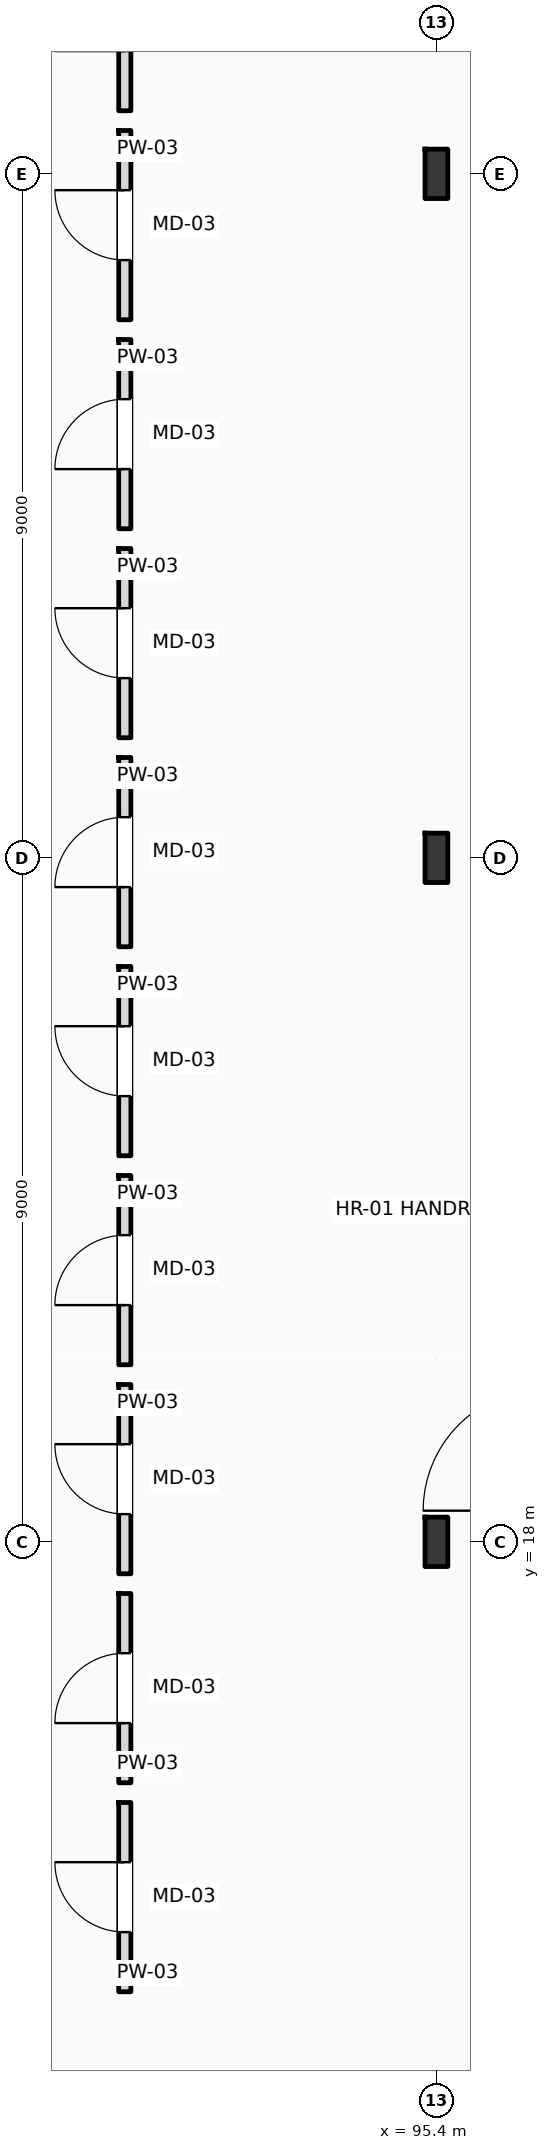
"""IFC4 building model, lengths in metres.
Left out: names, types, materials, properties, quantities, classifications, styles, units other than length and angle.
Written with IfcOpenShell. Run it as: python <this file> out.ifc"""

import sys

from ifc_helpers import new_model, si_unit, direction, frame, frame_2d, origin, origin_2d, place, context, subcontext, project, spatial, rectangle, i_section, extrude, element, fill, save


model = new_model("IFC4")
c1 = context("Model", 3, precision=1e-05, world=origin(), true_north=direction((0.0, 1.0)))
c2 = subcontext(c1, "Body", "Model", "MODEL_VIEW")
j1 = project(units=[si_unit("LENGTHUNIT", "METRE"), si_unit("PLANEANGLEUNIT", "RADIAN")], contexts=[c1])
p1 = place(None, origin())
s1 = spatial("IfcSite", under=j1, at=p1, CompositionType="ELEMENT")
p2 = place(p1, origin())
s2 = spatial("IfcBuilding", under=s1, at=p2, CompositionType="ELEMENT")
p3 = place(p2, frame((0.0, 0.0, 6.0)))
s3 = spatial("IfcBuildingStorey", under=s2, at=p3, CompositionType="ELEMENT", Elevation=6.0)
for number, where, z_axis, x_axis in (
    (1, (95.4, 18.0, 0.0), (0.0, 0.0, 1.0), (1.0, 0.0, 0.0)),
    (2, (95.4, 27.0, 0.0), (0.0, 0.0, 1.0), (1.0, 0.0, 0.0)),
    (3, (95.4, 36.0, 0.0), (0.0, 0.0, 1.0), (1.0, 0.0, 0.0)),
):
    element("IfcColumn", number, at=place(p3, frame(where, z_axis=z_axis, x_axis=x_axis)), inside=s3, PredefinedType="COLUMN", context=c2, shape_type="SweptSolid", body=[
        extrude(i_section(OverallWidth=0.3, OverallDepth=0.65, WebThickness=0.016, FlangeThickness=0.031, FilletRadius=0.027, at=origin_2d()), origin(), (0.0, 0.0, 1.0), 5.4),
    ])
p4 = place(p3, frame((91.3, 12.08, 0.0), z_axis=(0.0, 0.0, 1.0), x_axis=(0.0, 1.0, 0.0)))
e4 = element("IfcWall", 4, at=p4, inside=s3, PredefinedType="PARTITIONING", context=c2, shape_type="SweptSolid", body=[
    extrude(rectangle(XDim=2.49, YDim=0.16, at=frame_2d((1.245, 0.0))), origin(), (0.0, 0.0, 1.0), 5.05),
])
p5 = place(p4, frame((0.785, 0.0, 0.0)))
e5 = element("IfcOpeningElement", 5, at=p5, cuts=e4, PredefinedType="OPENING", context=c2, shape_type="SweptSolid", body=[
    extrude(rectangle(XDim=0.92, YDim=2.12, at=frame_2d((0.46, 1.06))), frame((0.0, 0.09, 0.0), z_axis=(0.0, -1.0, 0.0), x_axis=(1.0, 0.0, 0.0)), (0.0, 0.0, 1.0), 0.18),
])
p6 = place(p3, frame((91.3, 14.83, 0.0), z_axis=(0.0, 0.0, 1.0), x_axis=(0.0, 1.0, 0.0)))
e6 = element("IfcWall", 6, at=p6, inside=s3, PredefinedType="PARTITIONING", context=c2, shape_type="SweptSolid", body=[
    extrude(rectangle(XDim=2.49, YDim=0.16, at=frame_2d((1.245, 0.0))), origin(), (0.0, 0.0, 1.0), 5.05),
])
p7 = place(p6, frame((0.785, 0.0, 0.0)))
e7 = element("IfcOpeningElement", 7, at=p7, cuts=e6, PredefinedType="OPENING", context=c2, shape_type="SweptSolid", body=[
    extrude(rectangle(XDim=0.92, YDim=2.12, at=frame_2d((0.46, 1.06))), frame((0.0, 0.09, 0.0), z_axis=(0.0, -1.0, 0.0), x_axis=(1.0, 0.0, 0.0)), (0.0, 0.0, 1.0), 0.18),
])
p8 = place(p3, frame((91.3, 17.58, 0.0), z_axis=(0.0, 0.0, 1.0), x_axis=(0.0, 1.0, 0.0)))
e8 = element("IfcWall", 8, at=p8, inside=s3, PredefinedType="PARTITIONING", context=c2, shape_type="SweptSolid", body=[
    extrude(rectangle(XDim=2.49, YDim=0.16, at=frame_2d((1.245, 0.0))), origin(), (0.0, 0.0, 1.0), 5.05),
])
p9 = place(p8, frame((0.785, 0.0, 0.0)))
e9 = element("IfcOpeningElement", 9, at=p9, cuts=e8, PredefinedType="OPENING", context=c2, shape_type="SweptSolid", body=[
    extrude(rectangle(XDim=0.92, YDim=2.12, at=frame_2d((0.46, 1.06))), frame((0.0, 0.09, 0.0), z_axis=(0.0, -1.0, 0.0), x_axis=(1.0, 0.0, 0.0)), (0.0, 0.0, 1.0), 0.18),
])
p10 = place(p3, frame((91.3, 20.33, 0.0), z_axis=(0.0, 0.0, 1.0), x_axis=(0.0, 1.0, 0.0)))
e10 = element("IfcWall", 10, at=p10, inside=s3, PredefinedType="PARTITIONING", context=c2, shape_type="SweptSolid", body=[
    extrude(rectangle(XDim=2.49, YDim=0.16, at=frame_2d((1.245, 0.0))), origin(), (0.0, 0.0, 1.0), 5.05),
])
p11 = place(p10, frame((0.785, 0.0, 0.0)))
e11 = element("IfcOpeningElement", 11, at=p11, cuts=e10, PredefinedType="OPENING", context=c2, shape_type="SweptSolid", body=[
    extrude(rectangle(XDim=0.92, YDim=2.12, at=frame_2d((0.46, 1.06))), frame((0.0, 0.09, 0.0), z_axis=(0.0, -1.0, 0.0), x_axis=(1.0, 0.0, 0.0)), (0.0, 0.0, 1.0), 0.18),
])
p12 = place(p3, frame((91.3, 23.08, 0.0), z_axis=(0.0, 0.0, 1.0), x_axis=(0.0, 1.0, 0.0)))
e12 = element("IfcWall", 12, at=p12, inside=s3, PredefinedType="PARTITIONING", context=c2, shape_type="SweptSolid", body=[
    extrude(rectangle(XDim=2.49, YDim=0.16, at=frame_2d((1.245, 0.0))), origin(), (0.0, 0.0, 1.0), 5.05),
])
p13 = place(p12, frame((0.785, 0.0, 0.0)))
e13 = element("IfcOpeningElement", 13, at=p13, cuts=e12, PredefinedType="OPENING", context=c2, shape_type="SweptSolid", body=[
    extrude(rectangle(XDim=0.92, YDim=2.12, at=frame_2d((0.46, 1.06))), frame((0.0, 0.09, 0.0), z_axis=(0.0, -1.0, 0.0), x_axis=(1.0, 0.0, 0.0)), (0.0, 0.0, 1.0), 0.18),
])
p14 = place(p3, frame((91.3, 25.83, 0.0), z_axis=(0.0, 0.0, 1.0), x_axis=(0.0, 1.0, 0.0)))
e14 = element("IfcWall", 14, at=p14, inside=s3, PredefinedType="PARTITIONING", context=c2, shape_type="SweptSolid", body=[
    extrude(rectangle(XDim=2.49, YDim=0.16, at=frame_2d((1.245, 0.0))), origin(), (0.0, 0.0, 1.0), 5.05),
])
p15 = place(p14, frame((0.785, 0.0, 0.0)))
e15 = element("IfcOpeningElement", 15, at=p15, cuts=e14, PredefinedType="OPENING", context=c2, shape_type="SweptSolid", body=[
    extrude(rectangle(XDim=0.92, YDim=2.12, at=frame_2d((0.46, 1.06))), frame((0.0, 0.09, 0.0), z_axis=(0.0, -1.0, 0.0), x_axis=(1.0, 0.0, 0.0)), (0.0, 0.0, 1.0), 0.18),
])
p16 = place(p3, frame((91.3, 28.58, 0.0), z_axis=(0.0, 0.0, 1.0), x_axis=(0.0, 1.0, 0.0)))
e16 = element("IfcWall", 16, at=p16, inside=s3, PredefinedType="PARTITIONING", context=c2, shape_type="SweptSolid", body=[
    extrude(rectangle(XDim=2.49, YDim=0.16, at=frame_2d((1.245, 0.0))), origin(), (0.0, 0.0, 1.0), 5.05),
])
p17 = place(p16, frame((0.785, 0.0, 0.0)))
e17 = element("IfcOpeningElement", 17, at=p17, cuts=e16, PredefinedType="OPENING", context=c2, shape_type="SweptSolid", body=[
    extrude(rectangle(XDim=0.92, YDim=2.12, at=frame_2d((0.46, 1.06))), frame((0.0, 0.09, 0.0), z_axis=(0.0, -1.0, 0.0), x_axis=(1.0, 0.0, 0.0)), (0.0, 0.0, 1.0), 0.18),
])
p18 = place(p3, frame((91.3, 31.33, 0.0), z_axis=(0.0, 0.0, 1.0), x_axis=(0.0, 1.0, 0.0)))
e18 = element("IfcWall", 18, at=p18, inside=s3, PredefinedType="PARTITIONING", context=c2, shape_type="SweptSolid", body=[
    extrude(rectangle(XDim=2.49, YDim=0.16, at=frame_2d((1.245, 0.0))), origin(), (0.0, 0.0, 1.0), 5.05),
])
p19 = place(p18, frame((0.785, 0.0, 0.0)))
e19 = element("IfcOpeningElement", 19, at=p19, cuts=e18, PredefinedType="OPENING", context=c2, shape_type="SweptSolid", body=[
    extrude(rectangle(XDim=0.92, YDim=2.12, at=frame_2d((0.46, 1.06))), frame((0.0, 0.09, 0.0), z_axis=(0.0, -1.0, 0.0), x_axis=(1.0, 0.0, 0.0)), (0.0, 0.0, 1.0), 0.18),
])
p20 = place(p3, frame((91.3, 34.08, 0.0), z_axis=(0.0, 0.0, 1.0), x_axis=(0.0, 1.0, 0.0)))
e20 = element("IfcWall", 20, at=p20, inside=s3, PredefinedType="PARTITIONING", context=c2, shape_type="SweptSolid", body=[
    extrude(rectangle(XDim=2.49, YDim=0.16, at=frame_2d((1.245, 0.0))), origin(), (0.0, 0.0, 1.0), 5.05),
])
p21 = place(p20, frame((0.785, 0.0, 0.0)))
e21 = element("IfcOpeningElement", 21, at=p21, cuts=e20, PredefinedType="OPENING", context=c2, shape_type="SweptSolid", body=[
    extrude(rectangle(XDim=0.92, YDim=2.12, at=frame_2d((0.46, 1.06))), frame((0.0, 0.09, 0.0), z_axis=(0.0, -1.0, 0.0), x_axis=(1.0, 0.0, 0.0)), (0.0, 0.0, 1.0), 0.18),
])
p22 = place(p3, frame((91.3, 36.83, 0.0), z_axis=(0.0, 0.0, 1.0), x_axis=(0.0, 1.0, 0.0)))
e22 = element("IfcWall", 22, at=p22, inside=s3, PredefinedType="PARTITIONING", context=c2, shape_type="SweptSolid", body=[
    extrude(rectangle(XDim=2.49, YDim=0.16, at=frame_2d((1.245, 0.0))), origin(), (0.0, 0.0, 1.0), 5.05),
])
p23 = place(p22, frame((0.785, 0.0, 0.0)))
e23 = element("IfcOpeningElement", 23, at=p23, cuts=e22, PredefinedType="OPENING", context=c2, shape_type="SweptSolid", body=[
    extrude(rectangle(XDim=0.92, YDim=2.12, at=frame_2d((0.46, 1.06))), frame((0.0, 0.09, 0.0), z_axis=(0.0, -1.0, 0.0), x_axis=(1.0, 0.0, 0.0)), (0.0, 0.0, 1.0), 0.18),
])
p24 = place(p5, origin())
e24 = element("IfcDoor", 24, at=p24, inside=s3, OperationType="SINGLE_SWING_RIGHT", PredefinedType="DOOR", context=c2, shape_type="SweptSolid", body=[
    extrude(rectangle(XDim=0.92, YDim=2.12, at=frame_2d((0.46, 1.06))), frame((0.0, 0.025, 0.0), z_axis=(0.0, -1.0, 0.0), x_axis=(1.0, 0.0, 0.0)), (0.0, 0.0, 1.0), 0.05),
])
fill(e5, e24)
p25 = place(p7, origin())
e25 = element("IfcDoor", 25, at=p25, inside=s3, OperationType="SINGLE_SWING_LEFT", PredefinedType="DOOR", context=c2, shape_type="SweptSolid", body=[
    extrude(rectangle(XDim=0.92, YDim=2.12, at=frame_2d((0.46, 1.06))), frame((0.0, 0.025, 0.0), z_axis=(0.0, -1.0, 0.0), x_axis=(1.0, 0.0, 0.0)), (0.0, 0.0, 1.0), 0.05),
])
fill(e7, e25)
p26 = place(p9, origin())
e26 = element("IfcDoor", 26, at=p26, inside=s3, OperationType="SINGLE_SWING_RIGHT", PredefinedType="DOOR", context=c2, shape_type="SweptSolid", body=[
    extrude(rectangle(XDim=0.92, YDim=2.12, at=frame_2d((0.46, 1.06))), frame((0.0, 0.025, 0.0), z_axis=(0.0, -1.0, 0.0), x_axis=(1.0, 0.0, 0.0)), (0.0, 0.0, 1.0), 0.05),
])
fill(e9, e26)
p27 = place(p11, origin())
e27 = element("IfcDoor", 27, at=p27, inside=s3, OperationType="SINGLE_SWING_LEFT", PredefinedType="DOOR", context=c2, shape_type="SweptSolid", body=[
    extrude(rectangle(XDim=0.92, YDim=2.12, at=frame_2d((0.46, 1.06))), frame((0.0, 0.025, 0.0), z_axis=(0.0, -1.0, 0.0), x_axis=(1.0, 0.0, 0.0)), (0.0, 0.0, 1.0), 0.05),
])
fill(e11, e27)
p28 = place(p13, origin())
e28 = element("IfcDoor", 28, at=p28, inside=s3, OperationType="SINGLE_SWING_RIGHT", PredefinedType="DOOR", context=c2, shape_type="SweptSolid", body=[
    extrude(rectangle(XDim=0.92, YDim=2.12, at=frame_2d((0.46, 1.06))), frame((0.0, 0.025, 0.0), z_axis=(0.0, -1.0, 0.0), x_axis=(1.0, 0.0, 0.0)), (0.0, 0.0, 1.0), 0.05),
])
fill(e13, e28)
p29 = place(p15, origin())
e29 = element("IfcDoor", 29, at=p29, inside=s3, OperationType="SINGLE_SWING_LEFT", PredefinedType="DOOR", context=c2, shape_type="SweptSolid", body=[
    extrude(rectangle(XDim=0.92, YDim=2.12, at=frame_2d((0.46, 1.06))), frame((0.0, 0.025, 0.0), z_axis=(0.0, -1.0, 0.0), x_axis=(1.0, 0.0, 0.0)), (0.0, 0.0, 1.0), 0.05),
])
fill(e15, e29)
p30 = place(p17, origin())
e30 = element("IfcDoor", 30, at=p30, inside=s3, OperationType="SINGLE_SWING_RIGHT", PredefinedType="DOOR", context=c2, shape_type="SweptSolid", body=[
    extrude(rectangle(XDim=0.92, YDim=2.12, at=frame_2d((0.46, 1.06))), frame((0.0, 0.025, 0.0), z_axis=(0.0, -1.0, 0.0), x_axis=(1.0, 0.0, 0.0)), (0.0, 0.0, 1.0), 0.05),
])
fill(e17, e30)
p31 = place(p19, origin())
e31 = element("IfcDoor", 31, at=p31, inside=s3, OperationType="SINGLE_SWING_LEFT", PredefinedType="DOOR", context=c2, shape_type="SweptSolid", body=[
    extrude(rectangle(XDim=0.92, YDim=2.12, at=frame_2d((0.46, 1.06))), frame((0.0, 0.025, 0.0), z_axis=(0.0, -1.0, 0.0), x_axis=(1.0, 0.0, 0.0)), (0.0, 0.0, 1.0), 0.05),
])
fill(e19, e31)
p32 = place(p21, origin())
e32 = element("IfcDoor", 32, at=p32, inside=s3, OperationType="SINGLE_SWING_RIGHT", PredefinedType="DOOR", context=c2, shape_type="SweptSolid", body=[
    extrude(rectangle(XDim=0.92, YDim=2.12, at=frame_2d((0.46, 1.06))), frame((0.0, 0.025, 0.0), z_axis=(0.0, -1.0, 0.0), x_axis=(1.0, 0.0, 0.0)), (0.0, 0.0, 1.0), 0.05),
])
fill(e21, e32)
save(model, sys.argv[1])
